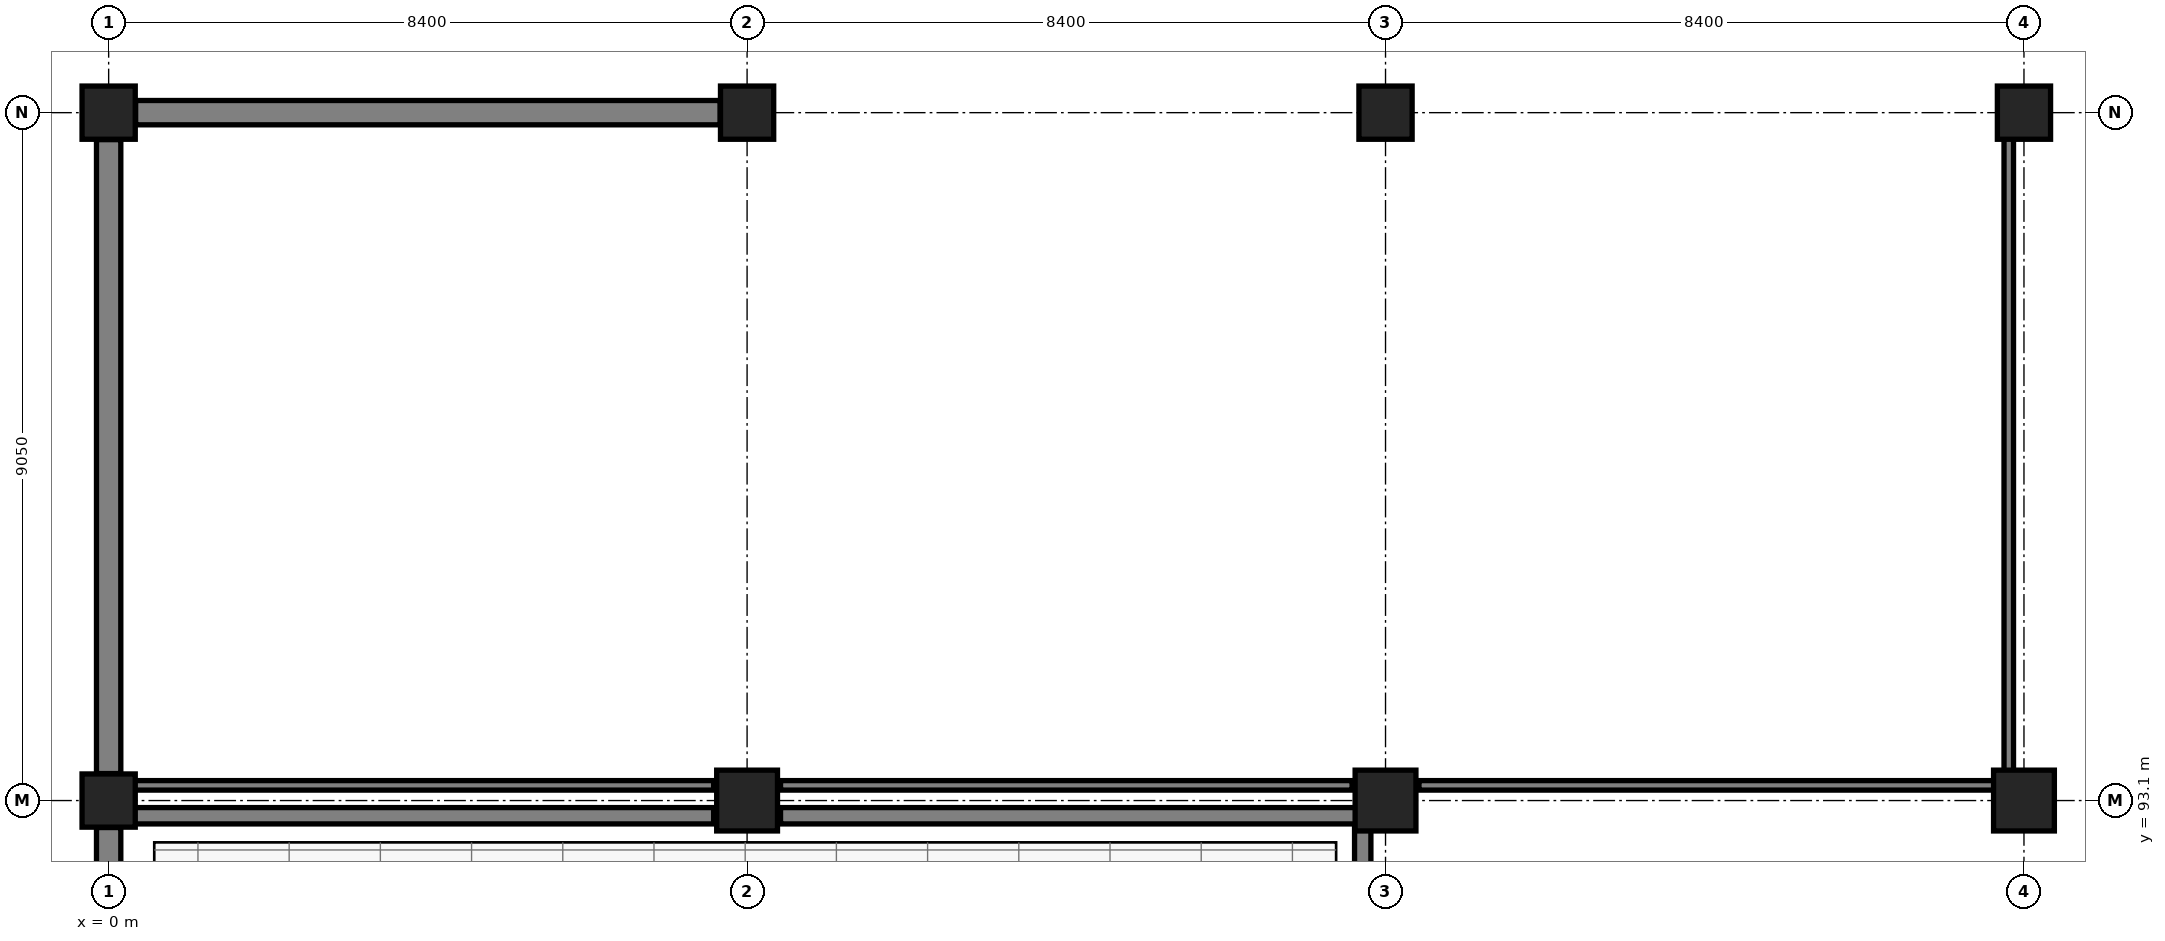
"""IFC4 building model, lengths in metres.
Left out: names, types, materials, properties, quantities, classifications, styles, units other than length and angle.
Written with IfcOpenShell. Run it as: python <this file> out.ifc"""

import sys

from ifc_helpers import new_model, si_unit, direction, frame, frame_2d, origin, origin_2d, place, context, subcontext, project, spatial, rectangle, extrude, element, fill, save


model = new_model("IFC4")
c1 = context("Model", 3, precision=1e-05, world=origin(), true_north=direction((0.0, 1.0)))
c2 = subcontext(c1, "Body", "Model", "MODEL_VIEW")
j1 = project(units=[si_unit("LENGTHUNIT", "METRE"), si_unit("PLANEANGLEUNIT", "RADIAN")], contexts=[c1])
p1 = place(None, origin())
s1 = spatial("IfcSite", under=j1, at=p1, CompositionType="ELEMENT")
p2 = place(p1, origin())
s2 = spatial("IfcBuilding", under=s1, at=p2, CompositionType="ELEMENT")
p3 = place(p2, origin())
s3 = spatial("IfcBuildingStorey", under=s2, at=p3, CompositionType="ELEMENT", Elevation=0.0)
for number, where, z_axis, x_axis in (
    (1, (0.0, 93.1, 0.0), (0.0, 0.0, 1.0), (1.0, 0.0, 0.0)),
    (2, (0.0, 102.15, 0.0), (0.0, 0.0, 1.0), (1.0, 0.0, 0.0)),
):
    element("IfcColumn", number, at=place(p3, frame(where, z_axis=z_axis, x_axis=x_axis)), inside=s3, PredefinedType="COLUMN", context=c2, shape_type="SweptSolid", body=[
        extrude(rectangle(XDim=0.7, YDim=0.7, at=origin_2d()), origin(), (0.0, 0.0, 1.0), 5.4),
    ])
p4 = place(p3, frame((8.4, 93.1, 0.0), z_axis=(0.0, 0.0, 1.0), x_axis=(1.0, 0.0, 0.0)))
e3 = element("IfcColumn", 3, at=p4, inside=s3, PredefinedType="COLUMN", context=c2, shape_type="SweptSolid", body=[
    extrude(rectangle(XDim=0.8, YDim=0.8, at=origin_2d()), origin(), (0.0, 0.0, 1.0), 5.4),
])
p5 = place(p3, frame((8.4, 102.15, 0.0), z_axis=(0.0, 0.0, 1.0), x_axis=(1.0, 0.0, 0.0)))
e4 = element("IfcColumn", 4, at=p5, inside=s3, PredefinedType="COLUMN", context=c2, shape_type="SweptSolid", body=[
    extrude(rectangle(XDim=0.7, YDim=0.7, at=origin_2d()), origin(), (0.0, 0.0, 1.0), 5.4),
])
p6 = place(p3, frame((16.8, 93.1, 0.0), z_axis=(0.0, 0.0, 1.0), x_axis=(1.0, 0.0, 0.0)))
e5 = element("IfcColumn", 5, at=p6, inside=s3, PredefinedType="COLUMN", context=c2, shape_type="SweptSolid", body=[
    extrude(rectangle(XDim=0.8, YDim=0.8, at=origin_2d()), origin(), (0.0, 0.0, 1.0), 5.4),
])
p7 = place(p3, frame((16.8, 102.15, 0.0), z_axis=(0.0, 0.0, 1.0), x_axis=(1.0, 0.0, 0.0)))
e6 = element("IfcColumn", 6, at=p7, inside=s3, PredefinedType="COLUMN", context=c2, shape_type="SweptSolid", body=[
    extrude(rectangle(XDim=0.7, YDim=0.7, at=origin_2d()), origin(), (0.0, 0.0, 1.0), 5.4),
])
p8 = place(p3, frame((25.2, 93.1, 0.0), z_axis=(0.0, 0.0, 1.0), x_axis=(1.0, 0.0, 0.0)))
e7 = element("IfcColumn", 7, at=p8, inside=s3, PredefinedType="COLUMN", context=c2, shape_type="SweptSolid", body=[
    extrude(rectangle(XDim=0.8, YDim=0.8, at=origin_2d()), origin(), (0.0, 0.0, 1.0), 5.4),
])
p9 = place(p3, frame((25.2, 102.15, 0.0), z_axis=(0.0, 0.0, 1.0), x_axis=(1.0, 0.0, 0.0)))
e8 = element("IfcColumn", 8, at=p9, inside=s3, PredefinedType="COLUMN", context=c2, shape_type="SweptSolid", body=[
    extrude(rectangle(XDim=0.7, YDim=0.7, at=origin_2d()), origin(), (0.0, 0.0, 1.0), 5.4),
])
p10 = place(p3, frame((8.045, 102.15, 0.0), z_axis=(0.0, 0.0, 1.0), x_axis=(-1.0, 0.0, 0.0)))
e9 = element("IfcWall", 9, at=p10, inside=s3, PredefinedType="STANDARD", context=c2, shape_type="SweptSolid", body=[
    extrude(rectangle(XDim=7.69, YDim=0.32, at=frame_2d((3.845, 0.0))), origin(), (0.0, 0.0, 1.0), 4.531),
])
p11 = place(p10, frame((3.07, 0.0, 0.95)))
e10 = element("IfcOpeningElement", 10, at=p11, cuts=e9, PredefinedType="OPENING", context=c2, shape_type="SweptSolid", body=[
    extrude(rectangle(XDim=1.55, YDim=1.7, at=frame_2d((0.775, 0.85))), frame((0.0, 0.17, 0.0), z_axis=(0.0, -1.0, 0.0), x_axis=(1.0, 0.0, 0.0)), (0.0, 0.0, 1.0), 0.34),
])
p12 = place(p3, frame((0.0, 101.795, 0.0), z_axis=(0.0, 0.0, 1.0), x_axis=(0.0, -1.0, 0.0)))
e11 = element("IfcWall", 11, at=p12, inside=s3, PredefinedType="STANDARD", context=c2, shape_type="SweptSolid", body=[
    extrude(rectangle(XDim=8.34, YDim=0.32, at=frame_2d((4.17, 0.0))), origin(), (0.0, 0.0, 1.0), 4.531),
])
p13 = place(p12, frame((2.72, 0.0, 0.95)))
e12 = element("IfcOpeningElement", 12, at=p13, cuts=e11, PredefinedType="OPENING", context=c2, shape_type="SweptSolid", body=[
    extrude(rectangle(XDim=2.9, YDim=1.9, at=frame_2d((1.45, 0.95))), frame((0.0, 0.17, 0.0), z_axis=(0.0, -1.0, 0.0), x_axis=(1.0, 0.0, 0.0)), (0.0, 0.0, 1.0), 0.34),
])
p14 = place(p3, frame((0.0, 92.745, 0.0), z_axis=(0.0, 0.0, 1.0), x_axis=(0.0, -1.0, 0.0)))
e13 = element("IfcWall", 13, at=p14, inside=s3, PredefinedType="STANDARD", context=c2, shape_type="SweptSolid", body=[
    extrude(rectangle(XDim=8.34, YDim=0.32, at=frame_2d((4.17, 0.0))), origin(), (0.0, 0.0, 1.0), 4.24),
])
p15 = place(p14, frame((3.395, 0.0, 0.95)))
e14 = element("IfcOpeningElement", 14, at=p15, cuts=e13, PredefinedType="OPENING", context=c2, shape_type="SweptSolid", body=[
    extrude(rectangle(XDim=1.55, YDim=1.7, at=frame_2d((0.775, 0.85))), frame((0.0, 0.17, 0.0), z_axis=(0.0, -1.0, 0.0), x_axis=(1.0, 0.0, 0.0)), (0.0, 0.0, 1.0), 0.34),
])
p16 = place(p3, frame((16.5, 84.49, 0.0), z_axis=(0.0, 0.0, 1.0), x_axis=(0.0, 1.0, 0.0)))
e15 = element("IfcWall", 15, at=p16, inside=s3, PredefinedType="PARTITIONING", context=c2, shape_type="SweptSolid", body=[
    extrude(rectangle(XDim=8.303, YDim=0.215, at=frame_2d((4.151, 0.0))), origin(), (0.0, 0.0, 1.0), 4.14),
])
p17 = place(p3, frame((0.143, 92.9, 0.0), z_axis=(0.0, 0.0, 1.0), x_axis=(1.0, 0.0, 0.0)))
e16 = element("IfcWall", 16, at=p17, inside=s3, PredefinedType="PARTITIONING", context=c2, shape_type="SweptSolid", body=[
    extrude(rectangle(XDim=7.817, YDim=0.215, at=frame_2d((3.908, 0.0))), origin(), (0.0, 0.0, 1.0), 4.23),
])
p18 = place(p3, frame((8.84, 92.9, 0.0), z_axis=(0.0, 0.0, 1.0), x_axis=(1.0, 0.0, 0.0)))
e17 = element("IfcWall", 17, at=p18, inside=s3, PredefinedType="PARTITIONING", context=c2, shape_type="SweptSolid", body=[
    extrude(rectangle(XDim=7.768, YDim=0.215, at=frame_2d((3.884, 0.0))), origin(), (0.0, 0.0, 1.0), 4.14),
])
p19 = place(p3, frame((25.0, 93.362, 0.0), z_axis=(0.0, 0.0, 1.0), x_axis=(0.0, 1.0, 0.0)))
e18 = element("IfcWall", 18, at=p19, inside=s3, PredefinedType="PARTITIONING", context=c2, shape_type="SweptSolid", body=[
    extrude(rectangle(XDim=8.526, YDim=0.125, at=frame_2d((4.263, 0.0))), origin(), (0.0, 0.0, 1.0), 4.14),
])
p20 = place(p19, frame((3.743, 0.0, 0.0)))
e19 = element("IfcOpeningElement", 19, at=p20, cuts=e18, PredefinedType="OPENING", context=c2, shape_type="SweptSolid", body=[
    extrude(rectangle(XDim=1.04, YDim=2.25, at=frame_2d((0.52, 1.125))), frame((0.0, 0.073, 0.0), z_axis=(0.0, -1.0, 0.0), x_axis=(1.0, 0.0, 0.0)), (0.0, 0.0, 1.0), 0.145),
])
p21 = place(p3, frame((0.188, 93.3, 0.0), z_axis=(0.0, 0.0, 1.0), x_axis=(1.0, 0.0, 0.0)))
e20 = element("IfcWall", 20, at=p21, inside=s3, PredefinedType="PARTITIONING", context=c2, shape_type="SweptSolid", body=[
    extrude(rectangle(XDim=7.772, YDim=0.125, at=frame_2d((3.886, 0.0))), origin(), (0.0, 0.0, 1.0), 4.23),
])
p22 = place(p3, frame((8.84, 93.3, 0.0), z_axis=(0.0, 0.0, 1.0), x_axis=(1.0, 0.0, 0.0)))
e21 = element("IfcWall", 21, at=p22, inside=s3, PredefinedType="PARTITIONING", context=c2, shape_type="SweptSolid", body=[
    extrude(rectangle(XDim=7.52, YDim=0.125, at=frame_2d((3.76, 0.0))), origin(), (0.0, 0.0, 1.0), 4.23),
])
p23 = place(p3, frame((17.24, 93.3, 0.0), z_axis=(0.0, 0.0, 1.0), x_axis=(1.0, 0.0, 0.0)))
e22 = element("IfcWall", 22, at=p23, inside=s3, PredefinedType="PARTITIONING", context=c2, shape_type="SweptSolid", body=[
    extrude(rectangle(XDim=7.822, YDim=0.125, at=frame_2d((3.911, 0.0))), origin(), (0.0, 0.0, 1.0), 4.14),
])
p24 = place(p11, origin())
e23 = element("IfcWindow", 23, at=p24, inside=s3, PartitioningType="SINGLE_PANEL", PredefinedType="WINDOW", context=c2, shape_type="SweptSolid", body=[
    extrude(rectangle(XDim=1.55, YDim=1.7, at=frame_2d((0.775, 0.85))), frame((0.0, 0.03, 0.0), z_axis=(0.0, -1.0, 0.0), x_axis=(1.0, 0.0, 0.0)), (0.0, 0.0, 1.0), 0.06),
])
fill(e10, e23)
p25 = place(p13, origin())
e24 = element("IfcWindow", 24, at=p25, inside=s3, PartitioningType="SINGLE_PANEL", PredefinedType="WINDOW", context=c2, shape_type="SweptSolid", body=[
    extrude(rectangle(XDim=2.9, YDim=1.9, at=frame_2d((1.45, 0.95))), frame((0.0, 0.03, 0.0), z_axis=(0.0, -1.0, 0.0), x_axis=(1.0, 0.0, 0.0)), (0.0, 0.0, 1.0), 0.06),
])
fill(e12, e24)
p26 = place(p20, origin())
e25 = element("IfcDoor", 25, at=p26, inside=s3, OperationType="SINGLE_SWING_LEFT", PredefinedType="DOOR", context=c2, shape_type="SweptSolid", body=[
    extrude(rectangle(XDim=1.04, YDim=2.25, at=frame_2d((0.52, 1.125))), frame((0.0, 0.025, 0.0), z_axis=(0.0, -1.0, 0.0), x_axis=(1.0, 0.0, 0.0)), (0.0, 0.0, 1.0), 0.05),
])
fill(e19, e25)
save(model, sys.argv[1])
